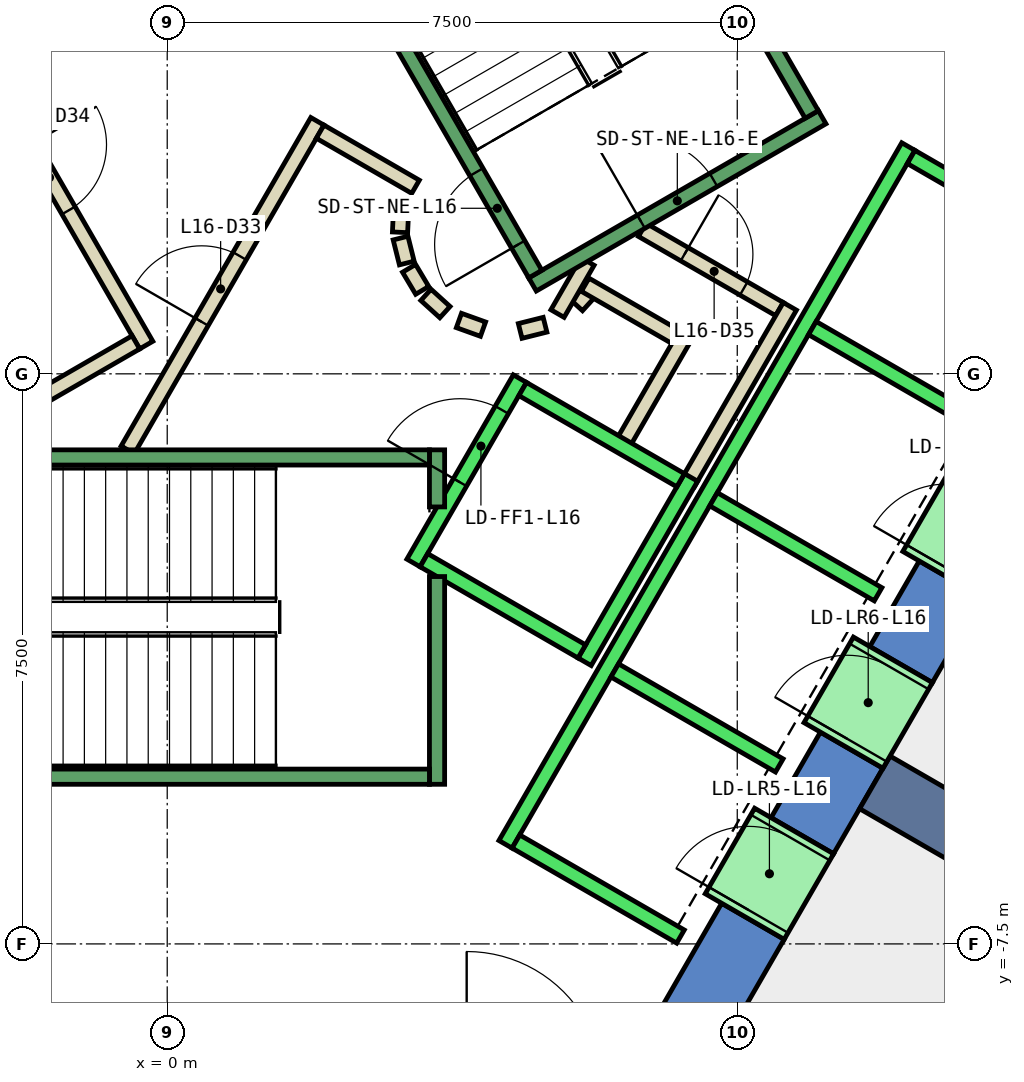
"""IFC4 building model, lengths in metres.
Left out: names, types, materials, properties, quantities, classifications, styles, units other than length and angle.
Written with IfcOpenShell. Run it as: python <this file> out.ifc"""

import sys

from ifc_helpers import new_model, si_unit, direction, frame, frame_2d, origin, place, context, subcontext, project, spatial, polyline, rectangle, outline, extrude, element, fill, save


model = new_model("IFC4")
c1 = context("Model", 3, precision=1e-05, world=origin(), true_north=direction((0.0, 1.0)))
c2 = subcontext(c1, "Body", "Model", "MODEL_VIEW")
j1 = project(units=[si_unit("LENGTHUNIT", "METRE"), si_unit("PLANEANGLEUNIT", "RADIAN")], contexts=[c1])
p1 = place(None, origin())
s1 = spatial("IfcSite", under=j1, at=p1, CompositionType="ELEMENT")
p2 = place(p1, origin())
s2 = spatial("IfcBuilding", under=s1, at=p2, CompositionType="ELEMENT")
p3 = place(p2, frame((0.0, 0.0, 77.0)))
s3 = spatial("IfcBuildingStorey", under=s2, at=p3, CompositionType="ELEMENT", Elevation=77.0)
p4 = place(p3, frame((0.0, 0.0, -0.4)))
e1 = element("IfcWall", 1, at=p4, inside=s3, PredefinedType="SHEAR", context=c2, shape_type="SweptSolid", body=[
    extrude(outline(polyline([(8.517, 11.748), (7.694, 11.273), (12.759, 2.5), (13.856, 2.5), (8.517, 11.748)])), origin(), (0.0, 0.0, 1.0), 4.0),
])
p5 = place(p3, frame((0.0, 0.0, -0.4)))
e2 = element("IfcWall", 2, at=p5, inside=s3, PredefinedType="SHEAR", context=c2, shape_type="SweptSolid", body=[
    extrude(outline(polyline([(8.117, -7.44), (7.295, -6.965), (6.38, -8.55), (6.928, -9.5), (8.117, -7.44)])), origin(), (0.0, 0.0, 1.0), 4.0),
])
p6 = place(p3, frame((0.0, 0.0, -0.4)))
e3 = element("IfcWall", 3, at=p6, inside=s3, PredefinedType="SHEAR", context=c2, shape_type="SweptSolid", body=[
    extrude(outline(polyline([(9.417, -5.189), (8.594, -4.714), (7.945, -5.839), (8.767, -6.314), (9.417, -5.189)])), origin(), (0.0, 0.0, 1.0), 4.0),
])
p7 = place(p3, frame((0.0, 0.0, -0.4)))
e4 = element("IfcWall", 4, at=p7, inside=s3, PredefinedType="SHEAR", context=c2, shape_type="SweptSolid", body=[
    extrude(outline(polyline([(10.717, -2.937), (9.894, -2.462), (9.244, -3.588), (10.067, -4.063), (10.717, -2.937)])), origin(), (0.0, 0.0, 1.0), 4.0),
])
p8 = place(p3, frame((9.31, -5.375, -0.4), z_axis=(0.0, 0.0, 1.0), x_axis=(0.866017533419, -0.500013631625, 0.0)))
e5 = element("IfcWall", 5, at=p8, inside=s3, PredefinedType="SHEAR", context=c2, shape_type="SweptSolid", body=[
    extrude(rectangle(XDim=9.0, YDim=0.8, at=frame_2d((4.5, 0.0))), origin(), (0.0, 0.0, 1.0), 4.0),
])
p9 = place(p3, frame((5.39, 0.898, 0.0), z_axis=(0.0, 0.0, 1.0), x_axis=(0.673828488714, 0.738887791073, 0.0)))
e6 = element("IfcWall", 6, at=p9, inside=s3, PredefinedType="PARTITIONING", context=c2, shape_type="SweptSolid", body=[
    extrude(rectangle(XDim=0.263, YDim=0.2, at=frame_2d((0.131, 0.0))), origin(), (0.0, 0.0, 1.0), 3.6),
])
p10 = place(p3, frame((5.499, 1.172, 0.0), z_axis=(0.0, 0.0, 1.0), x_axis=(0.866333505267, -0.499465972466, 0.0)))
e7 = element("IfcWall", 7, at=p10, inside=s3, PredefinedType="PARTITIONING", context=c2, shape_type="SweptSolid", body=[
    extrude(rectangle(XDim=1.374, YDim=0.2, at=frame_2d((0.687, 0.0))), origin(), (0.0, 0.0, 1.0), 3.6),
])
p11 = place(p3, frame((6.826, 0.522, 0.0), z_axis=(0.0, 0.0, 1.0), x_axis=(-0.500016722714, -0.866015748706, 0.0)))
e8 = element("IfcWall", 8, at=p11, inside=s3, PredefinedType="PARTITIONING", context=c2, shape_type="SweptSolid", body=[
    extrude(rectangle(XDim=1.7, YDim=0.2, at=frame_2d((0.85, 0.0))), origin(), (0.0, 0.0, 1.0), 3.6),
])
p12 = place(p3, frame((6.25, 1.894, 0.0), z_axis=(0.0, 0.0, 1.0), x_axis=(0.866043184279, -0.499969202016, 0.0)))
e9 = element("IfcWall", 9, at=p12, inside=s3, PredefinedType="PARTITIONING", context=c2, shape_type="SweptSolid", body=[
    extrude(rectangle(XDim=2.084, YDim=0.2, at=frame_2d((1.042, 0.0))), origin(), (0.0, 0.0, 1.0), 3.6),
])
p13 = place(p12, frame((0.642, 0.0, 0.0)))
e10 = element("IfcOpeningElement", 10, at=p13, cuts=e9, PredefinedType="OPENING", context=c2, shape_type="SweptSolid", body=[
    extrude(rectangle(XDim=0.9, YDim=2.1, at=frame_2d((0.45, 1.05))), frame((0.0, 0.11, 0.0), z_axis=(0.0, -1.0, 0.0), x_axis=(1.0, 0.0, 0.0)), (0.0, 0.0, 1.0), 0.22),
])
p14 = place(p3, frame((8.192, 0.888, 0.0), z_axis=(0.0, 0.0, 1.0), x_axis=(-0.499940625693, -0.866059680843, 0.0)))
e11 = element("IfcWall", 11, at=p14, inside=s3, PredefinedType="PARTITIONING", context=c2, shape_type="SweptSolid", body=[
    extrude(rectangle(XDim=2.68, YDim=0.2, at=frame_2d((1.34, 0.0))), origin(), (0.0, 0.0, 1.0), 3.6),
])
p15 = place(p3, frame((5.135, 0.793, 0.0), z_axis=(0.0, 0.0, 1.0), x_axis=(0.499526442893, 0.866298639529, 0.0)))
e12 = element("IfcWall", 12, at=p15, inside=s3, PredefinedType="PARTITIONING", context=c2, shape_type="SweptSolid", body=[
    extrude(rectangle(XDim=0.791, YDim=0.2, at=frame_2d((0.396, 0.0))), origin(), (0.0, 0.0, 1.0), 3.6),
])
p16 = place(p3, frame((-0.52, -1.0, 0.0), z_axis=(0.0, 0.0, 1.0), x_axis=(0.50011622646, 0.865958290007, 0.0)))
e13 = element("IfcWall", 13, at=p16, inside=s3, PredefinedType="PARTITIONING", context=c2, shape_type="SweptSolid", body=[
    extrude(rectangle(XDim=4.991, YDim=0.2, at=frame_2d((2.496, 0.0))), origin(), (0.0, 0.0, 1.0), 3.6),
])
p17 = place(p16, frame((1.945, 0.0, 0.0)))
e14 = element("IfcOpeningElement", 14, at=p17, cuts=e13, PredefinedType="OPENING", context=c2, shape_type="SweptSolid", body=[
    extrude(rectangle(XDim=1.0, YDim=2.1, at=frame_2d((0.5, 1.05))), frame((0.0, 0.11, 0.0), z_axis=(0.0, -1.0, 0.0), x_axis=(1.0, 0.0, 0.0)), (0.0, 0.0, 1.0), 0.22),
])
p18 = place(p3, frame((2.012, 3.186, 0.0), z_axis=(0.0, 0.0, 1.0), x_axis=(0.865891012941, -0.500232699559, 0.0)))
e15 = element("IfcWall", 15, at=p18, inside=s3, PredefinedType="PARTITIONING", context=c2, shape_type="SweptSolid", body=[
    extrude(rectangle(XDim=1.449, YDim=0.2, at=frame_2d((0.725, 0.0))), origin(), (0.0, 0.0, 1.0), 3.6),
])
p19 = place(p3, frame((3.079, 2.199, 0.0), z_axis=(0.0, 0.0, 1.0), x_axis=(-0.047771483479, -0.998858290933, 0.0)))
e16 = element("IfcWall", 16, at=p19, inside=s3, PredefinedType="PARTITIONING", context=c2, shape_type="SweptSolid", body=[
    extrude(rectangle(XDim=0.337, YDim=0.2, at=frame_2d((0.169, 0.0))), origin(), (0.0, 0.0, 1.0), 3.6),
])
p20 = place(p3, frame((3.07, 1.786, 0.0), z_axis=(0.0, 0.0, 1.0), x_axis=(0.242705583207, -0.970099994784, 0.0)))
e17 = element("IfcWall", 17, at=p20, inside=s3, PredefinedType="PARTITIONING", context=c2, shape_type="SweptSolid", body=[
    extrude(rectangle(XDim=0.338, YDim=0.2, at=frame_2d((0.169, 0.0))), origin(), (0.0, 0.0, 1.0), 3.6),
])
for number, where, z_axis, x_axis in (
    (18, (3.182, 1.388, 0.0), (0.0, 0.0, 1.0), (0.512, -0.859, 0.0)),
    (19, (3.404, 1.039, 0.0), (0.0, 0.0, 1.0), (0.74, -0.672, 0.0)),
):
    element("IfcWall", number, at=place(p3, frame(where, z_axis=z_axis, x_axis=x_axis)), inside=s3, PredefinedType="PARTITIONING", context=c2, shape_type="SweptSolid", body=[
        extrude(rectangle(XDim=0.338, YDim=0.2, at=frame_2d((0.169, 0.0))), origin(), (0.0, 0.0, 1.0), 3.6),
    ])
p21 = place(p3, frame((3.838, 0.702, 0.0), z_axis=(0.0, 0.0, 1.0), x_axis=(0.941035081519, -0.338308993895, 0.0)))
e20 = element("IfcWall", 20, at=p21, inside=s3, PredefinedType="PARTITIONING", context=c2, shape_type="SweptSolid", body=[
    extrude(rectangle(XDim=0.337, YDim=0.2, at=frame_2d((0.168, 0.0))), origin(), (0.0, 0.0, 1.0), 3.6),
])
p22 = place(p3, frame((4.644, 0.564, 0.0), z_axis=(0.0, 0.0, 1.0), x_axis=(0.969929076366, 0.243387729394, 0.0)))
e21 = element("IfcWall", 21, at=p22, inside=s3, PredefinedType="PARTITIONING", context=c2, shape_type="SweptSolid", body=[
    extrude(rectangle(XDim=0.337, YDim=0.2, at=frame_2d((0.168, 0.0))), origin(), (0.0, 0.0, 1.0), 3.6),
])
p23 = place(p3, frame((-2.771, 4.7, 0.0), z_axis=(0.0, 0.0, 1.0), x_axis=(0.499969479948, -0.866043023828, 0.0)))
e22 = element("IfcWall", 22, at=p23, inside=s3, PredefinedType="PARTITIONING", context=c2, shape_type="SweptSolid", body=[
    extrude(rectangle(XDim=4.99, YDim=0.2, at=frame_2d((2.495, 0.0))), origin(), (0.0, 0.0, 1.0), 3.6),
])
p24 = place(p23, frame((1.945, 0.0, 0.0)))
e23 = element("IfcOpeningElement", 23, at=p24, cuts=e22, PredefinedType="OPENING", context=c2, shape_type="SweptSolid", body=[
    extrude(rectangle(XDim=1.0, YDim=2.1, at=frame_2d((0.5, 1.05))), frame((0.0, 0.11, 0.0), z_axis=(0.0, -1.0, 0.0), x_axis=(1.0, 0.0, 0.0)), (0.0, 0.0, 1.0), 0.22),
])
p25 = place(p3, frame((-0.412, 0.414, 0.0), z_axis=(0.0, 0.0, 1.0), x_axis=(-0.866017369001, -0.500013916395, 0.0)))
e24 = element("IfcWall", 24, at=p25, inside=s3, PredefinedType="PARTITIONING", context=c2, shape_type="SweptSolid", body=[
    extrude(rectangle(XDim=1.45, YDim=0.2, at=frame_2d((0.725, 0.0))), origin(), (0.0, 0.0, 1.0), 3.6),
])
p26 = place(p3, frame((12.4, -7.621, 0.0), z_axis=(0.0, 0.0, 1.0), x_axis=(-0.49990497871, -0.866080257402, 0.0)))
e25 = element("IfcWall", 25, at=p26, inside=s3, PredefinedType="PARTITIONING", context=c2, shape_type="SweptSolid", body=[
    extrude(rectangle(XDim=9.302, YDim=0.2, at=frame_2d((4.651, 0.0))), origin(), (0.0, 0.0, 1.0), 3.6),
])
p27 = place(p3, frame((3.24, -2.488, 0.0), z_axis=(0.0, 0.0, 1.0), x_axis=(0.49994636267, 0.866056369097, 0.0)))
e26 = element("IfcWall", 26, at=p27, inside=s3, PredefinedType="STANDARD", context=c2, shape_type="SweptSolid", body=[
    extrude(rectangle(XDim=2.8, YDim=0.2, at=frame_2d((1.4, 0.0))), origin(), (0.0, 0.0, 1.0), 3.6),
])
p28 = place(p27, frame((1.225, 0.0, 0.0)))
e27 = element("IfcOpeningElement", 27, at=p28, cuts=e26, PredefinedType="OPENING", context=c2, shape_type="SweptSolid", body=[
    extrude(rectangle(XDim=1.1, YDim=2.1, at=frame_2d((0.55, 1.05))), frame((0.0, 0.11, 0.0), z_axis=(0.0, -1.0, 0.0), x_axis=(1.0, 0.0, 0.0)), (0.0, 0.0, 1.0), 0.22),
])
p29 = place(p3, frame((5.492, -3.788, 0.0), z_axis=(0.0, 0.0, 1.0), x_axis=(0.500011755427, 0.866018616679, 0.0)))
e28 = element("IfcWall", 28, at=p29, inside=s3, PredefinedType="STANDARD", context=c2, shape_type="SweptSolid", body=[
    extrude(rectangle(XDim=2.8, YDim=0.2, at=frame_2d((1.4, 0.0))), origin(), (0.0, 0.0, 1.0), 3.6),
])
p30 = place(p3, frame((3.377, -2.452, 0.0), z_axis=(0.0, 0.0, 1.0), x_axis=(0.865955154139, -0.50012165622, 0.0)))
e29 = element("IfcWall", 29, at=p30, inside=s3, PredefinedType="STANDARD", context=c2, shape_type="SweptSolid", body=[
    extrude(rectangle(XDim=2.4, YDim=0.2, at=frame_2d((1.2, 0.0))), origin(), (0.0, 0.0, 1.0), 3.6),
])
p31 = place(p3, frame((4.677, -0.2, 0.0), z_axis=(0.0, 0.0, 1.0), x_axis=(0.865973769406, -0.500089422704, 0.0)))
e30 = element("IfcWall", 30, at=p31, inside=s3, PredefinedType="STANDARD", context=c2, shape_type="SweptSolid", body=[
    extrude(rectangle(XDim=2.399, YDim=0.2, at=frame_2d((1.2, 0.0))), origin(), (0.0, 0.0, 1.0), 3.6),
])
p32 = place(p3, frame((4.451, -6.19, 0.0), z_axis=(0.0, 0.0, 1.0), x_axis=(0.50000090737, 0.866024879913, 0.0)))
e31 = element("IfcWall", 31, at=p32, inside=s3, PredefinedType="STANDARD", context=c2, shape_type="SweptSolid", body=[
    extrude(rectangle(XDim=10.6, YDim=0.2, at=frame_2d((5.3, 0.0))), origin(), (0.0, 0.0, 1.0), 3.6),
])
for number, where, z_axis, x_axis in (
    (32, (4.588, -6.153, 0.0), (0.0, 0.0, 1.0), (0.866, -0.5, 0.0)),
    (33, (5.888, -3.902, 0.0), (0.0, 0.0, 1.0), (0.866, -0.5, 0.0)),
    (34, (7.188, -1.65, 0.0), (0.0, 0.0, 1.0), (0.866, -0.5, 0.0)),
    (35, (8.488, 0.602, 0.0), (0.0, 0.0, 1.0), (0.866, -0.5, 0.0)),
):
    element("IfcWall", number, at=place(p3, frame(where, z_axis=z_axis, x_axis=x_axis)), inside=s3, PredefinedType="STANDARD", context=c2, shape_type="SweptSolid", body=[
        extrude(rectangle(XDim=2.5, YDim=0.2, at=frame_2d((1.25, 0.0))), origin(), (0.0, 0.0, 1.0), 3.6),
    ])
p33 = place(p3, frame((9.788, 2.853, 0.0), z_axis=(0.0, 0.0, 1.0), x_axis=(0.865998541277, -0.500046524342, 0.0)))
e36 = element("IfcWall", 36, at=p33, inside=s3, PredefinedType="STANDARD", context=c2, shape_type="SweptSolid", body=[
    extrude(rectangle(XDim=2.5, YDim=0.2, at=frame_2d((1.25, 0.0))), origin(), (0.0, 0.0, 1.0), 3.6),
])
p34 = place(p3, frame((7.598, -7.14, 0.0), z_axis=(0.0, 0.0, 1.0), x_axis=(0.500362116554, 0.865816234728, 0.0)))
e37 = element("IfcWall", 37, at=p34, inside=s3, PredefinedType="STANDARD", context=c2, shape_type="SweptSolid", body=[
    extrude(rectangle(XDim=1.299, YDim=1.2, at=frame_2d((0.65, 0.0))), origin(), (0.0, 0.0, 1.0), 2.4),
])
p35 = place(p34, frame((0.1, 0.0, 0.0)))
e38 = element("IfcOpeningElement", 38, at=p35, cuts=e37, PredefinedType="OPENING", context=c2, shape_type="SweptSolid", body=[
    extrude(rectangle(XDim=1.1, YDim=2.3, at=frame_2d((0.55, 1.15))), frame((0.0, 0.61, 0.0), z_axis=(0.0, -1.0, 0.0), x_axis=(1.0, 0.0, 0.0)), (0.0, 0.0, 1.0), 1.22),
])
p36 = place(p3, frame((8.898, -4.889, 0.0), z_axis=(0.0, 0.0, 1.0), x_axis=(0.500036693733, 0.866004217611, 0.0)))
e39 = element("IfcWall", 39, at=p36, inside=s3, PredefinedType="STANDARD", context=c2, shape_type="SweptSolid", body=[
    extrude(rectangle(XDim=1.3, YDim=1.2, at=frame_2d((0.65, 0.0))), origin(), (0.0, 0.0, 1.0), 2.4),
])
p37 = place(p36, frame((0.1, 0.0, 0.0)))
e40 = element("IfcOpeningElement", 40, at=p37, cuts=e39, PredefinedType="OPENING", context=c2, shape_type="SweptSolid", body=[
    extrude(rectangle(XDim=1.1, YDim=2.3, at=frame_2d((0.55, 1.15))), frame((0.0, 0.61, 0.0), z_axis=(0.0, -1.0, 0.0), x_axis=(1.0, 0.0, 0.0)), (0.0, 0.0, 1.0), 1.22),
])
p38 = place(p3, frame((10.198, -2.637, 0.0), z_axis=(0.0, 0.0, 1.0), x_axis=(0.49989585183, 0.866085525409, 0.0)))
e41 = element("IfcWall", 41, at=p38, inside=s3, PredefinedType="STANDARD", context=c2, shape_type="SweptSolid", body=[
    extrude(rectangle(XDim=1.3, YDim=1.2, at=frame_2d((0.65, 0.0))), origin(), (0.0, 0.0, 1.0), 2.4),
])
p39 = place(p38, frame((0.1, 0.0, 0.0)))
e42 = element("IfcOpeningElement", 42, at=p39, cuts=e41, PredefinedType="OPENING", context=c2, shape_type="SweptSolid", body=[
    extrude(rectangle(XDim=1.1, YDim=2.3, at=frame_2d((0.55, 1.15))), frame((0.0, 0.61, 0.0), z_axis=(0.0, -1.0, 0.0), x_axis=(1.0, 0.0, 0.0)), (0.0, 0.0, 1.0), 1.22),
])
p40 = place(p3, frame((3.55, -2.667, 0.0), z_axis=(0.0, 0.0, 1.0), x_axis=(0.0, -1.0, 0.0)))
e43 = element("IfcWall", 43, at=p40, inside=s3, PredefinedType="STANDARD", context=c2, shape_type="SweptSolid", body=[
    extrude(rectangle(XDim=2.733, YDim=0.2, at=frame_2d((1.366, 0.0))), origin(), (0.0, 0.0, 1.0), 3.6),
])
p41 = place(p3, frame((3.55, -1.0, 0.0), z_axis=(0.0, 0.0, 1.0), x_axis=(0.0, -1.0, 0.0)))
e44 = element("IfcWall", 44, at=p41, inside=s3, PredefinedType="STANDARD", context=c2, shape_type="SweptSolid", body=[
    extrude(rectangle(XDim=0.751, YDim=0.2, at=frame_2d((0.375, 0.0))), origin(), (0.0, 0.0, 1.0), 3.6),
])
p42 = place(p3, frame((-3.45, -1.1, 0.0), z_axis=(0.0, 0.0, 1.0), x_axis=(1.0, 0.0, 0.0)))
e45 = element("IfcWall", 45, at=p42, inside=s3, PredefinedType="STANDARD", context=c2, shape_type="SweptSolid", body=[
    extrude(rectangle(XDim=6.9, YDim=0.2, at=frame_2d((3.45, 0.0))), origin(), (0.0, 0.0, 1.0), 3.6),
])
p43 = place(p42, frame((0.45, 0.0, 0.0)))
e46 = element("IfcOpeningElement", 46, at=p43, cuts=e45, PredefinedType="OPENING", context=c2, shape_type="SweptSolid", body=[
    extrude(rectangle(XDim=1.1, YDim=2.2, at=frame_2d((0.55, 1.1))), frame((0.0, 0.11, 0.0), z_axis=(0.0, -1.0, 0.0), x_axis=(1.0, 0.0, 0.0)), (0.0, 0.0, 1.0), 0.22),
])
p44 = place(p3, frame((-3.45, -5.3, 0.0), z_axis=(0.0, 0.0, 1.0), x_axis=(1.0, 0.0, 0.0)))
e47 = element("IfcWall", 47, at=p44, inside=s3, PredefinedType="STANDARD", context=c2, shape_type="SweptSolid", body=[
    extrude(rectangle(XDim=6.9, YDim=0.2, at=frame_2d((3.45, 0.0))), origin(), (0.0, 0.0, 1.0), 3.6),
])
p45 = place(p3, frame((4.806, 1.176, 0.0), z_axis=(0.0, 0.0, 1.0), x_axis=(0.866059941101, 0.499940174841, 0.0)))
e48 = element("IfcWall", 48, at=p45, inside=s3, PredefinedType="STANDARD", context=c2, shape_type="SweptSolid", body=[
    extrude(rectangle(XDim=4.4, YDim=0.2, at=frame_2d((2.2, 0.0))), origin(), (0.0, 0.0, 1.0), 3.6),
])
p46 = place(p45, frame((1.65, 0.0, 0.0)))
e49 = element("IfcOpeningElement", 49, at=p46, cuts=e48, PredefinedType="OPENING", context=c2, shape_type="SweptSolid", body=[
    extrude(rectangle(XDim=1.1, YDim=2.2, at=frame_2d((0.55, 1.1))), frame((0.0, 0.11, 0.0), z_axis=(0.0, -1.0, 0.0), x_axis=(1.0, 0.0, 0.0)), (0.0, 0.0, 1.0), 0.22),
])
p47 = place(p3, frame((4.843, 1.312, 0.0), z_axis=(0.0, 0.0, 1.0), x_axis=(-0.499963383562, 0.866046543262, 0.0)))
e50 = element("IfcWall", 50, at=p47, inside=s3, PredefinedType="STANDARD", context=c2, shape_type="SweptSolid", body=[
    extrude(rectangle(XDim=6.9, YDim=0.2, at=frame_2d((3.45, 0.0))), origin(), (0.0, 0.0, 1.0), 3.6),
])
p48 = place(p47, frame((0.45, 0.0, 0.0)))
e51 = element("IfcOpeningElement", 51, at=p48, cuts=e50, PredefinedType="OPENING", context=c2, shape_type="SweptSolid", body=[
    extrude(rectangle(XDim=1.1, YDim=2.2, at=frame_2d((0.55, 1.1))), frame((0.0, 0.11, 0.0), z_axis=(0.0, -1.0, 0.0), x_axis=(1.0, 0.0, 0.0)), (0.0, 0.0, 1.0), 0.22),
])
p49 = place(p3, frame((8.48, 3.412, 0.0), z_axis=(0.0, 0.0, 1.0), x_axis=(-0.499978703459, 0.866037698999, 0.0)))
e52 = element("IfcWall", 52, at=p49, inside=s3, PredefinedType="STANDARD", context=c2, shape_type="SweptSolid", body=[
    extrude(rectangle(XDim=6.9, YDim=0.2, at=frame_2d((3.45, 0.0))), origin(), (0.0, 0.0, 1.0), 3.6),
])
p50 = place(p3, frame((-1.393, 7.288, 0.0), z_axis=(0.0, 0.0, 1.0), x_axis=(-0.499963383562, -0.866046543262, 0.0)))
e53 = element("IfcWall", 53, at=p50, inside=s3, PredefinedType="STANDARD", context=c2, shape_type="SweptSolid", body=[
    extrude(rectangle(XDim=6.9, YDim=0.2, at=frame_2d((3.45, 0.0))), origin(), (0.0, 0.0, 1.0), 3.6),
])
p51 = place(p50, frame((0.45, 0.0, 0.0)))
e54 = element("IfcOpeningElement", 54, at=p51, cuts=e53, PredefinedType="OPENING", context=c2, shape_type="SweptSolid", body=[
    extrude(rectangle(XDim=1.1, YDim=2.2, at=frame_2d((0.55, 1.1))), frame((0.0, 0.11, 0.0), z_axis=(0.0, -1.0, 0.0), x_axis=(1.0, 0.0, 0.0)), (0.0, 0.0, 1.0), 0.22),
])
p52 = place(p17, origin())
e55 = element("IfcDoor", 55, at=p52, inside=s3, OperationType="SINGLE_SWING_LEFT", PredefinedType="DOOR", context=c2, shape_type="SweptSolid", body=[
    extrude(rectangle(XDim=1.0, YDim=2.1, at=frame_2d((0.5, 1.05))), frame((0.0, 0.025, 0.0), z_axis=(0.0, -1.0, 0.0), x_axis=(1.0, 0.0, 0.0)), (0.0, 0.0, 1.0), 0.05),
])
fill(e14, e55)
p53 = place(p24, origin())
e56 = element("IfcDoor", 56, at=p53, inside=s3, OperationType="SINGLE_SWING_RIGHT", PredefinedType="DOOR", context=c2, shape_type="SweptSolid", body=[
    extrude(rectangle(XDim=1.0, YDim=2.1, at=frame_2d((0.5, 1.05))), frame((0.0, 0.025, 0.0), z_axis=(0.0, -1.0, 0.0), x_axis=(1.0, 0.0, 0.0)), (0.0, 0.0, 1.0), 0.05),
])
fill(e23, e56)
p54 = place(p13, origin())
e57 = element("IfcDoor", 57, at=p54, inside=s3, OperationType="SINGLE_SWING_LEFT", PredefinedType="DOOR", context=c2, shape_type="SweptSolid", body=[
    extrude(rectangle(XDim=0.9, YDim=2.1, at=frame_2d((0.45, 1.05))), frame((0.0, 0.025, 0.0), z_axis=(0.0, -1.0, 0.0), x_axis=(1.0, 0.0, 0.0)), (0.0, 0.0, 1.0), 0.05),
])
fill(e10, e57)
p55 = place(p35, origin())
e58 = element("IfcDoor", 58, at=p55, inside=s3, OperationType="SLIDING_TO_LEFT", PredefinedType="DOOR", context=c2, shape_type="SweptSolid", body=[
    extrude(rectangle(XDim=1.1, YDim=2.3, at=frame_2d((0.55, 1.15))), frame((0.0, 0.025, 0.0), z_axis=(0.0, -1.0, 0.0), x_axis=(1.0, 0.0, 0.0)), (0.0, 0.0, 1.0), 0.05),
])
fill(e38, e58)
p56 = place(p37, origin())
e59 = element("IfcDoor", 59, at=p56, inside=s3, OperationType="SLIDING_TO_LEFT", PredefinedType="DOOR", context=c2, shape_type="SweptSolid", body=[
    extrude(rectangle(XDim=1.1, YDim=2.3, at=frame_2d((0.55, 1.15))), frame((0.0, 0.025, 0.0), z_axis=(0.0, -1.0, 0.0), x_axis=(1.0, 0.0, 0.0)), (0.0, 0.0, 1.0), 0.05),
])
fill(e40, e59)
p57 = place(p28, origin())
e60 = element("IfcDoor", 60, at=p57, inside=s3, OperationType="SLIDING_TO_LEFT", PredefinedType="DOOR", context=c2, shape_type="SweptSolid", body=[
    extrude(rectangle(XDim=1.1, YDim=2.1, at=frame_2d((0.55, 1.05))), frame((0.0, 0.025, 0.0), z_axis=(0.0, -1.0, 0.0), x_axis=(1.0, 0.0, 0.0)), (0.0, 0.0, 1.0), 0.05),
])
fill(e27, e60)
p58 = place(p48, origin())
e61 = element("IfcDoor", 61, at=p58, inside=s3, OperationType="SINGLE_SWING_LEFT", PredefinedType="DOOR", context=c2, shape_type="SweptSolid", body=[
    extrude(rectangle(XDim=1.1, YDim=2.2, at=frame_2d((0.55, 1.1))), frame((0.0, 0.025, 0.0), z_axis=(0.0, -1.0, 0.0), x_axis=(1.0, 0.0, 0.0)), (0.0, 0.0, 1.0), 0.05),
])
fill(e51, e61)
p59 = place(p46, origin())
e62 = element("IfcDoor", 62, at=p59, inside=s3, OperationType="SINGLE_SWING_LEFT", PredefinedType="DOOR", context=c2, shape_type="SweptSolid", body=[
    extrude(rectangle(XDim=1.1, YDim=2.2, at=frame_2d((0.55, 1.1))), frame((0.0, 0.025, 0.0), z_axis=(0.0, -1.0, 0.0), x_axis=(1.0, 0.0, 0.0)), (0.0, 0.0, 1.0), 0.05),
])
fill(e49, e62)
save(model, sys.argv[1])
